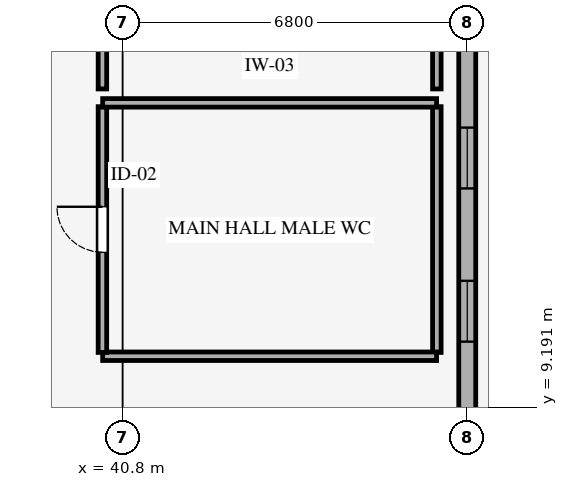
"""IFC4 building model, lengths in metres.
Left out: names, types, materials, properties, quantities, classifications, styles, units other than length and angle.
Written with IfcOpenShell. Run it as: python <this file> out.ifc"""

import sys

from ifc_helpers import new_model, si_unit, direction, frame, frame_2d, origin, place, context, subcontext, project, spatial, rectangle, extrude, element, fill, save


model = new_model("IFC4")
c1 = context("Model", 3, precision=1e-05, world=origin(), true_north=direction((0.0, 1.0)))
c2 = subcontext(c1, "Body", "Model", "MODEL_VIEW")
j1 = project(units=[si_unit("LENGTHUNIT", "METRE"), si_unit("PLANEANGLEUNIT", "RADIAN")], contexts=[c1])
p1 = place(None, origin())
s1 = spatial("IfcSite", under=j1, at=p1, CompositionType="ELEMENT")
p2 = place(p1, origin())
s2 = spatial("IfcBuilding", under=s1, at=p2, CompositionType="ELEMENT")
p3 = place(p2, origin())
s3 = spatial("IfcBuildingStorey", under=s2, at=p3, CompositionType="ELEMENT", Elevation=0.0)
p4 = place(p3, frame((47.6, 16.8, 0.0), z_axis=(0.0, 0.0, 1.0), x_axis=(0.0, -1.0, 0.0)))
e1 = element("IfcWall", 1, at=p4, inside=s3, PredefinedType="STANDARD", context=c2, shape_type="SweptSolid", body=[
    extrude(rectangle(XDim=8.4, YDim=0.335, at=frame_2d((4.2, 0.0))), origin(), (0.0, 0.0, 1.0), 3.62),
])
p5 = place(p4, frame((2.088, 0.0, 1.5)))
e2 = element("IfcOpeningElement", 2, at=p5, cuts=e1, PredefinedType="OPENING", context=c2, shape_type="SweptSolid", body=[
    extrude(rectangle(XDim=1.2, YDim=1.05, at=frame_2d((0.6, 0.525))), frame((0.0, 0.177, 0.0), z_axis=(0.0, -1.0, 0.0), x_axis=(1.0, 0.0, 0.0)), (0.0, 0.0, 1.0), 0.355),
])
p6 = place(p4, frame((5.112, 0.0, 1.5)))
e3 = element("IfcOpeningElement", 3, at=p6, cuts=e1, PredefinedType="OPENING", context=c2, shape_type="SweptSolid", body=[
    extrude(rectangle(XDim=1.2, YDim=1.05, at=frame_2d((0.6, 0.525))), frame((0.0, 0.177, 0.0), z_axis=(0.0, -1.0, 0.0), x_axis=(1.0, 0.0, 0.0)), (0.0, 0.0, 1.0), 0.355),
])
p7 = place(p3, frame((47.0, 15.125, 0.0), z_axis=(0.0, 0.0, 1.0), x_axis=(0.0, -1.0, 0.0)))
e4 = element("IfcWall", 4, at=p7, inside=s3, PredefinedType="STANDARD", context=c2, shape_type="SweptSolid", body=[
    extrude(rectangle(XDim=4.85, YDim=0.168, at=frame_2d((2.425, 0.0))), origin(), (0.0, 0.0, 1.0), 4.49),
])
p8 = place(p3, frame((46.995, 10.2, 0.0), z_axis=(0.0, 0.0, 1.0), x_axis=(-1.0, 0.0, 0.0)))
e5 = element("IfcWall", 5, at=p8, inside=s3, PredefinedType="STANDARD", context=c2, shape_type="SweptSolid", body=[
    extrude(rectangle(XDim=6.59, YDim=0.168, at=frame_2d((3.295, 0.0))), origin(), (0.0, 0.0, 1.0), 4.02),
])
p9 = place(p3, frame((40.4, 10.275, 0.0), z_axis=(0.0, 0.0, 1.0), x_axis=(0.0, 1.0, 0.0)))
e6 = element("IfcWall", 6, at=p9, inside=s3, PredefinedType="STANDARD", context=c2, shape_type="SweptSolid", body=[
    extrude(rectangle(XDim=4.85, YDim=0.168, at=frame_2d((2.425, 0.0))), origin(), (0.0, 0.0, 1.0), 4.49),
])
p10 = place(p9, frame((1.975, 0.0, 0.0)))
e7 = element("IfcOpeningElement", 7, at=p10, cuts=e6, PredefinedType="OPENING", context=c2, shape_type="SweptSolid", body=[
    extrude(rectangle(XDim=0.9, YDim=2.1, at=frame_2d((0.45, 1.05))), frame((0.0, 0.094, 0.0), z_axis=(0.0, -1.0, 0.0), x_axis=(1.0, 0.0, 0.0)), (0.0, 0.0, 1.0), 0.188),
])
p11 = place(p3, frame((40.405, 15.2, 0.0), z_axis=(0.0, 0.0, 1.0), x_axis=(1.0, 0.0, 0.0)))
e8 = element("IfcWall", 8, at=p11, inside=s3, PredefinedType="STANDARD", context=c2, shape_type="SweptSolid", body=[
    extrude(rectangle(XDim=6.59, YDim=0.168, at=frame_2d((3.295, 0.0))), origin(), (0.0, 0.0, 1.0), 4.02),
])
p12 = place(p3, frame((47.0, 17.135, 0.0), z_axis=(0.0, 0.0, 1.0), x_axis=(0.0, -1.0, 0.0)))
e9 = element("IfcWall", 9, at=p12, inside=s3, PredefinedType="STANDARD", context=c2, shape_type="SweptSolid", body=[
    extrude(rectangle(XDim=1.66, YDim=0.168, at=frame_2d((0.83, 0.0))), origin(), (0.0, 0.0, 1.0), 3.62),
])
p13 = place(p3, frame((40.4, 15.475, 0.0), z_axis=(0.0, 0.0, 1.0), x_axis=(0.0, 1.0, 0.0)))
e10 = element("IfcWall", 10, at=p13, inside=s3, PredefinedType="STANDARD", context=c2, shape_type="SweptSolid", body=[
    extrude(rectangle(XDim=4.85, YDim=0.168, at=frame_2d((2.425, 0.0))), origin(), (0.0, 0.0, 1.0), 3.62),
])
p14 = place(p13, frame((1.975, 0.0, 0.0)))
e11 = element("IfcOpeningElement", 11, at=p14, cuts=e10, PredefinedType="OPENING", context=c2, shape_type="SweptSolid", body=[
    extrude(rectangle(XDim=0.9, YDim=2.1, at=frame_2d((0.45, 1.05))), frame((0.0, 0.094, 0.0), z_axis=(0.0, -1.0, 0.0), x_axis=(1.0, 0.0, 0.0)), (0.0, 0.0, 1.0), 0.188),
])
p15 = place(p5, origin())
e12 = element("IfcWindow", 12, at=p15, inside=s3, PartitioningType="SINGLE_PANEL", PredefinedType="WINDOW", context=c2, shape_type="SweptSolid", body=[
    extrude(rectangle(XDim=1.2, YDim=1.05, at=frame_2d((0.6, 0.525))), frame((0.0, 0.03, 0.0), z_axis=(0.0, -1.0, 0.0), x_axis=(1.0, 0.0, 0.0)), (0.0, 0.0, 1.0), 0.06),
])
fill(e2, e12)
p16 = place(p6, origin())
e13 = element("IfcWindow", 13, at=p16, inside=s3, PartitioningType="SINGLE_PANEL", PredefinedType="WINDOW", context=c2, shape_type="SweptSolid", body=[
    extrude(rectangle(XDim=1.2, YDim=1.05, at=frame_2d((0.6, 0.525))), frame((0.0, 0.03, 0.0), z_axis=(0.0, -1.0, 0.0), x_axis=(1.0, 0.0, 0.0)), (0.0, 0.0, 1.0), 0.06),
])
fill(e3, e13)
p17 = place(p10, origin())
e14 = element("IfcDoor", 14, at=p17, inside=s3, OperationType="SINGLE_SWING_RIGHT", PredefinedType="DOOR", context=c2, shape_type="SweptSolid", body=[
    extrude(rectangle(XDim=0.9, YDim=2.1, at=frame_2d((0.45, 1.05))), frame((0.0, 0.025, 0.0), z_axis=(0.0, -1.0, 0.0), x_axis=(1.0, 0.0, 0.0)), (0.0, 0.0, 1.0), 0.05),
])
fill(e7, e14)
save(model, sys.argv[1])
